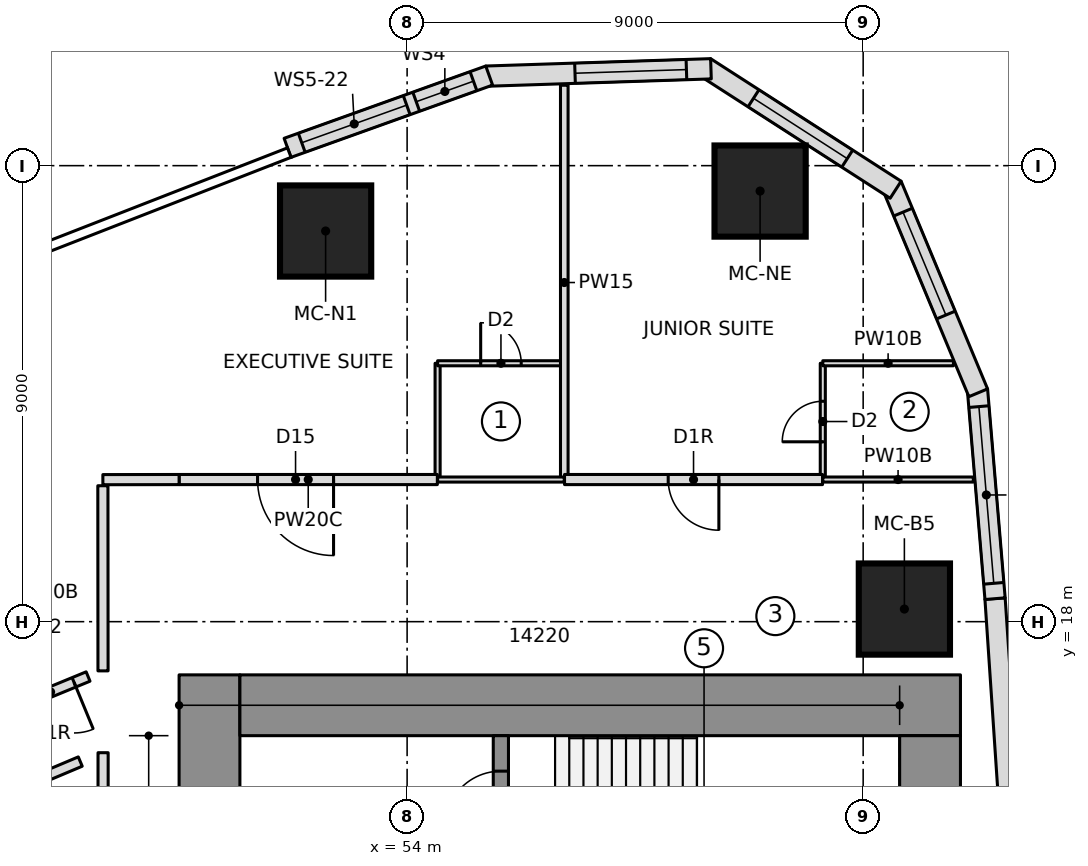
"""IFC4 building model, lengths in metres.
Left out: names, types, materials, properties, quantities, classifications, styles, units other than length and angle.
Written with IfcOpenShell. Run it as: python <this file> out.ifc"""

import sys

from ifc_helpers import new_model, si_unit, direction, frame, frame_2d, origin, origin_2d, place, context, subcontext, project, spatial, polyline, rectangle, outline, extrude, element, fill, save


model = new_model("IFC4")
c1 = context("Model", 3, precision=1e-05, world=origin(), true_north=direction((0.0, 1.0)))
c2 = subcontext(c1, "Body", "Model", "MODEL_VIEW")
j1 = project(units=[si_unit("LENGTHUNIT", "METRE"), si_unit("PLANEANGLEUNIT", "RADIAN")], contexts=[c1])
p1 = place(None, origin())
s1 = spatial("IfcSite", under=j1, at=p1, CompositionType="ELEMENT")
p2 = place(p1, origin())
s2 = spatial("IfcBuilding", under=s1, at=p2, CompositionType="ELEMENT")
p3 = place(p2, frame((0.0, 0.0, 60.9)))
s3 = spatial("IfcBuildingStorey", under=s2, at=p3, CompositionType="ELEMENT", Elevation=60.9)
p4 = place(p3, frame((50.1, 6.65, 0.0), z_axis=(0.0, 0.0, 1.0), x_axis=(0.0, 1.0, 0.0)))
e1 = element("IfcWall", 1, at=p4, inside=s3, PredefinedType="SHEAR", context=c2, shape_type="SweptSolid", body=[
    extrude(rectangle(XDim=10.3, YDim=1.2, at=frame_2d((5.15, 0.0))), origin(), (0.0, 0.0, 1.0), 3.55),
])
p5 = place(p4, frame((6.5, 0.0, 0.0)))
e2 = element("IfcOpeningElement", 2, at=p5, cuts=e1, PredefinedType="OPENING", context=c2, shape_type="SweptSolid", body=[
    extrude(rectangle(XDim=1.1, YDim=2.1, at=frame_2d((0.55, 1.05))), frame((0.0, 0.61, 0.0), z_axis=(0.0, -1.0, 0.0), x_axis=(1.0, 0.0, 0.0)), (0.0, 0.0, 1.0), 1.22),
])
p6 = place(p3, frame((50.7, 16.35, 0.0), z_axis=(0.0, 0.0, 1.0), x_axis=(1.0, 0.0, 0.0)))
e3 = element("IfcWall", 3, at=p6, inside=s3, PredefinedType="SHEAR", context=c2, shape_type="SweptSolid", body=[
    extrude(rectangle(XDim=14.22, YDim=1.2, at=frame_2d((7.11, 0.0))), origin(), (0.0, 0.0, 1.0), 3.55),
])
p7 = place(p3, frame((64.32, 9.95, 0.0), z_axis=(0.0, 0.0, 1.0), x_axis=(0.0, 1.0, 0.0)))
e4 = element("IfcWall", 4, at=p7, inside=s3, PredefinedType="SHEAR", context=c2, shape_type="SweptSolid", body=[
    extrude(rectangle(XDim=5.8, YDim=1.2, at=frame_2d((2.9, 0.0))), origin(), (0.0, 0.0, 1.0), 3.55),
])
p8 = place(p3, frame((55.85, 10.35, 0.0), z_axis=(0.0, 0.0, 1.0), x_axis=(0.0, 1.0, 0.0)))
e5 = element("IfcWall", 5, at=p8, inside=s3, PredefinedType="SHEAR", context=c2, shape_type="SweptSolid", body=[
    extrude(rectangle(XDim=5.4, YDim=0.3, at=frame_2d((2.7, 0.0))), origin(), (0.0, 0.0, 1.0), 3.55),
])
p9 = place(p8, frame((1.43, 0.0, 0.0)))
e6 = element("IfcOpeningElement", 6, at=p9, cuts=e5, PredefinedType="OPENING", context=c2, shape_type="SweptSolid", body=[
    extrude(rectangle(XDim=1.1, YDim=2.1, at=frame_2d((0.55, 1.05))), frame((0.0, 0.16, 0.0), z_axis=(0.0, -1.0, 0.0), x_axis=(1.0, 0.0, 0.0)), (0.0, 0.0, 1.0), 0.32),
])
p10 = place(p8, frame((3.6, 0.0, 0.0)))
e7 = element("IfcOpeningElement", 7, at=p10, cuts=e5, PredefinedType="OPENING", context=c2, shape_type="SweptSolid", body=[
    extrude(rectangle(XDim=1.1, YDim=2.1, at=frame_2d((0.55, 1.05))), frame((0.0, 0.16, 0.0), z_axis=(0.0, -1.0, 0.0), x_axis=(1.0, 0.0, 0.0)), (0.0, 0.0, 1.0), 0.32),
])
for number, where, z_axis, x_axis in (
    (8, (63.813, 18.249, 0.0), (0.0, 0.0, 1.0), (1.0, 0.0, 0.0)),
    (9, (60.966, 26.499, 0.0), (0.0, 0.0, 1.0), (1.0, 0.0, 0.0)),
    (10, (52.392, 25.71, 0.0), (0.0, 0.0, 1.0), (1.0, 0.0, 0.0)),
):
    element("IfcColumn", number, at=place(p3, frame(where, z_axis=z_axis, x_axis=x_axis)), inside=s3, PredefinedType="COLUMN", context=c2, shape_type="SweptSolid", body=[
        extrude(rectangle(XDim=1.8, YDim=1.8, at=origin_2d()), origin(), (0.0, 0.0, 1.0), 3.55),
    ])
p11 = place(p3, frame((65.878, 14.36, 0.0), z_axis=(0.0, 0.0, 1.0), x_axis=(-0.067087430225, 0.997747100575, 0.0)))
e11 = element("IfcWall", 11, at=p11, inside=s3, PredefinedType="NOTDEFINED", context=c2, shape_type="SweptSolid", body=[
    extrude(outline(polyline([(-0.002, -0.2), (4.107, -0.2), (4.103, 0.2), (0.002, 0.2), (-0.002, -0.2)])), origin(), (0.0, 0.0, 1.0), 3.25),
])
p12 = place(p3, frame((65.603, 18.455, 0.0), z_axis=(0.0, 0.0, 1.0), x_axis=(-0.083793550906, 0.996483136248, 0.0)))
e12 = element("IfcWall", 12, at=p12, inside=s3, PredefinedType="NOTDEFINED", context=c2, shape_type="SweptSolid", body=[
    extrude(outline(polyline([(-0.002, -0.2), (4.136, -0.2), (4.074, 0.2), (0.002, 0.2), (-0.002, -0.2)])), origin(), (0.0, 0.0, 1.0), 3.25),
])
p13 = place(p12, frame((0.302, 0.0, 0.9)))
e13 = element("IfcOpeningElement", 13, at=p13, cuts=e12, PredefinedType="OPENING", context=c2, shape_type="SweptSolid", body=[
    extrude(rectangle(XDim=3.5, YDim=1.8, at=frame_2d((1.75, 0.9))), frame((0.0, 0.21, 0.0), z_axis=(0.0, -1.0, 0.0), x_axis=(1.0, 0.0, 0.0)), (0.0, 0.0, 1.0), 0.42),
])
p14 = place(p3, frame((65.259, 22.546, 0.0), z_axis=(0.0, 0.0, 1.0), x_axis=(-0.384372042685, 0.923178277908, 0.0)))
e14 = element("IfcWall", 14, at=p14, inside=s3, PredefinedType="NOTDEFINED", context=c2, shape_type="SweptSolid", body=[
    extrude(outline(polyline([(-0.031, -0.2), (4.408, -0.2), (4.283, 0.2), (0.031, 0.2), (-0.031, -0.2)])), origin(), (0.0, 0.0, 1.0), 3.25),
])
p15 = place(p14, frame((1.631, 0.0, 0.6)))
e15 = element("IfcOpeningElement", 15, at=p15, cuts=e14, PredefinedType="OPENING", context=c2, shape_type="SweptSolid", body=[
    extrude(outline(polyline([(0.0, 1.35), (0.084, 1.771), (0.322, 2.128), (0.679, 2.366), (1.1, 2.45), (1.521, 2.366), (1.878, 2.128), (2.116, 1.771), (2.2, 1.35), (2.2, 1.1), (2.116, 0.679), (1.878, 0.322), (1.521, 0.084), (1.1, 0.0), (0.679, 0.084), (0.322, 0.322), (0.084, 0.679), (0.0, 1.1), (0.0, 1.35)])), frame((0.0, 0.21, 0.0), z_axis=(0.0, -1.0, 0.0), x_axis=(1.0, 0.0, 0.0)), (0.0, 0.0, 1.0), 0.42),
])
p16 = place(p3, frame((63.588, 26.558, 0.0), z_axis=(0.0, 0.0, 1.0), x_axis=(-0.840937468718, 0.541132307025, 0.0)))
e16 = element("IfcWall", 16, at=p16, inside=s3, PredefinedType="NOTDEFINED", context=c2, shape_type="SweptSolid", body=[
    extrude(outline(polyline([(-0.062, -0.2), (4.409, -0.2), (4.284, 0.2), (0.062, 0.2), (-0.062, -0.2)])), origin(), (0.0, 0.0, 1.0), 3.25),
])
p17 = place(p16, frame((1.073, 0.0, 0.6)))
e17 = element("IfcOpeningElement", 17, at=p17, cuts=e16, PredefinedType="OPENING", context=c2, shape_type="SweptSolid", body=[
    extrude(outline(polyline([(0.0, 1.35), (0.084, 1.771), (0.322, 2.128), (0.679, 2.366), (1.1, 2.45), (1.521, 2.366), (1.878, 2.128), (2.116, 1.771), (2.2, 1.35), (2.2, 1.1), (2.116, 0.679), (1.878, 0.322), (1.521, 0.084), (1.1, 0.0), (0.679, 0.084), (0.322, 0.322), (0.084, 0.679), (0.0, 1.1), (0.0, 1.35)])), frame((0.0, 0.21, 0.0), z_axis=(0.0, -1.0, 0.0), x_axis=(1.0, 0.0, 0.0)), (0.0, 0.0, 1.0), 0.42),
])
p18 = place(p3, frame((59.934, 28.91, 0.0), z_axis=(0.0, 0.0, 1.0), x_axis=(-0.999463576228, -0.032749958686, 0.0)))
e18 = element("IfcWall", 18, at=p18, inside=s3, PredefinedType="NOTDEFINED", context=c2, shape_type="SweptSolid", body=[
    extrude(outline(polyline([(-0.062, -0.2), (4.378, -0.2), (4.315, 0.2), (0.062, 0.2), (-0.062, -0.2)])), origin(), (0.0, 0.0, 1.0), 3.25),
])
p19 = place(p18, frame((0.422, 0.0, 0.6)))
e19 = element("IfcOpeningElement", 19, at=p19, cuts=e18, PredefinedType="OPENING", context=c2, shape_type="SweptSolid", body=[
    extrude(outline(polyline([(0.0, 1.35), (0.084, 1.771), (0.322, 2.128), (0.679, 2.366), (1.1, 2.45), (1.521, 2.366), (1.878, 2.128), (2.116, 1.771), (2.2, 1.35), (2.2, 1.1), (2.116, 0.679), (1.878, 0.322), (1.521, 0.084), (1.1, 0.0), (0.679, 0.084), (0.322, 0.322), (0.084, 0.679), (0.0, 1.1), (0.0, 1.35)])), frame((0.0, 0.21, 0.0), z_axis=(0.0, -1.0, 0.0), x_axis=(1.0, 0.0, 0.0)), (0.0, 0.0, 1.0), 0.42),
])
p20 = place(p3, frame((55.59, 28.768, 0.0), z_axis=(0.0, 0.0, 1.0), x_axis=(-0.941339752885, -0.337460323057, 0.0)))
e20 = element("IfcWall", 20, at=p20, inside=s3, PredefinedType="NOTDEFINED", context=c2, shape_type="SweptSolid", body=[
    extrude(outline(polyline([(-0.031, -0.2), (4.196, -0.2), (4.196, 0.2), (0.031, 0.2), (-0.031, -0.2)])), origin(), (0.0, 0.0, 1.0), 3.25),
])
p21 = place(p20, frame((0.298, 0.0, 0.9)))
e21 = element("IfcOpeningElement", 21, at=p21, cuts=e20, PredefinedType="OPENING", context=c2, shape_type="SweptSolid", body=[
    extrude(rectangle(XDim=1.2, YDim=1.8, at=frame_2d((0.6, 0.9))), frame((0.0, 0.21, 0.0), z_axis=(0.0, -1.0, 0.0), x_axis=(1.0, 0.0, 0.0)), (0.0, 0.0, 1.0), 0.42),
])
p22 = place(p20, frame((1.698, 0.0, 0.9)))
e22 = element("IfcOpeningElement", 22, at=p22, cuts=e20, PredefinedType="OPENING", context=c2, shape_type="SweptSolid", body=[
    extrude(rectangle(XDim=2.2, YDim=1.8, at=frame_2d((1.1, 0.9))), frame((0.0, 0.21, 0.0), z_axis=(0.0, -1.0, 0.0), x_axis=(1.0, 0.0, 0.0)), (0.0, 0.0, 1.0), 0.42),
])
p23 = place(p3, frame((54.602, 20.8, 0.0), z_axis=(0.0, 0.0, 1.0), x_axis=(0.0, 1.0, 0.0)))
e23 = element("IfcWall", 23, at=p23, inside=s3, PredefinedType="PARTITIONING", context=c2, shape_type="SweptSolid", body=[
    extrude(rectangle(XDim=2.3, YDim=0.1, at=frame_2d((1.15, 0.0))), origin(), (0.0, 0.0, 1.0), 3.25),
])
p24 = place(p3, frame((54.602, 23.1, 0.0), z_axis=(0.0, 0.0, 1.0), x_axis=(1.0, 0.0, 0.0)))
e24 = element("IfcWall", 24, at=p24, inside=s3, PredefinedType="PARTITIONING", context=c2, shape_type="SweptSolid", body=[
    extrude(rectangle(XDim=2.5, YDim=0.1, at=frame_2d((1.25, 0.0))), origin(), (0.0, 0.0, 1.0), 3.25),
])
p25 = place(p24, frame((0.85, 0.0, 0.0)))
e25 = element("IfcOpeningElement", 25, at=p25, cuts=e24, PredefinedType="OPENING", context=c2, shape_type="SweptSolid", body=[
    extrude(rectangle(XDim=0.8, YDim=2.1, at=frame_2d((0.4, 1.05))), frame((0.0, 0.06, 0.0), z_axis=(0.0, -1.0, 0.0), x_axis=(1.0, 0.0, 0.0)), (0.0, 0.0, 1.0), 0.12),
])
p26 = place(p3, frame((62.203, 20.8, 0.0), z_axis=(0.0, 0.0, 1.0), x_axis=(0.0, 1.0, 0.0)))
e26 = element("IfcWall", 26, at=p26, inside=s3, PredefinedType="PARTITIONING", context=c2, shape_type="SweptSolid", body=[
    extrude(rectangle(XDim=2.3, YDim=0.1, at=frame_2d((1.15, 0.0))), origin(), (0.0, 0.0, 1.0), 3.25),
])
p27 = place(p26, frame((0.75, 0.0, 0.0)))
e27 = element("IfcOpeningElement", 27, at=p27, cuts=e26, PredefinedType="OPENING", context=c2, shape_type="SweptSolid", body=[
    extrude(rectangle(XDim=0.8, YDim=2.1, at=frame_2d((0.4, 1.05))), frame((0.0, 0.06, 0.0), z_axis=(0.0, -1.0, 0.0), x_axis=(1.0, 0.0, 0.0)), (0.0, 0.0, 1.0), 0.12),
])
p28 = place(p3, frame((62.203, 23.1, 0.0), z_axis=(0.0, 0.0, 1.0), x_axis=(1.0, 0.0, 0.0)))
e28 = element("IfcWall", 28, at=p28, inside=s3, PredefinedType="PARTITIONING", context=c2, shape_type="SweptSolid", body=[
    extrude(rectangle(XDim=2.578, YDim=0.1, at=frame_2d((1.289, 0.0))), origin(), (0.0, 0.0, 1.0), 3.25),
])
p29 = place(p3, frame((57.102, 20.8, 0.0), z_axis=(0.0, 0.0, 1.0), x_axis=(0.0, 1.0, 0.0)))
e29 = element("IfcWall", 29, at=p29, inside=s3, PredefinedType="PARTITIONING", context=c2, shape_type="SweptSolid", body=[
    extrude(rectangle(XDim=7.787, YDim=0.15, at=frame_2d((3.894, 0.0))), origin(), (0.0, 0.0, 1.0), 3.25),
])
p30 = place(p3, frame((43.85, 13.677, 0.0), z_axis=(0.0, 0.0, 1.0), x_axis=(0.921269894054, 0.388923877269, 0.0)))
e30 = element("IfcWall", 30, at=p30, inside=s3, PredefinedType="PARTITIONING", context=c2, shape_type="SweptSolid", body=[
    extrude(rectangle(XDim=4.016, YDim=0.2, at=frame_2d((2.008, 0.0))), origin(), (0.0, 0.0, 1.0), 3.25),
])
p31 = place(p3, frame((54.597, 20.805, 0.0), z_axis=(0.0, 0.0, 1.0), x_axis=(-1.0, 0.0, 0.0)))
e31 = element("IfcWall", 31, at=p31, inside=s3, PredefinedType="PARTITIONING", context=c2, shape_type="SweptSolid", body=[
    extrude(rectangle(XDim=5.097, YDim=0.2, at=frame_2d((2.548, 0.0))), origin(), (0.0, 0.0, 1.0), 3.25),
])
p32 = place(p31, frame((2.048, 0.0, 0.0)))
e32 = element("IfcOpeningElement", 32, at=p32, cuts=e31, PredefinedType="OPENING", context=c2, shape_type="SweptSolid", body=[
    extrude(rectangle(XDim=1.5, YDim=2.1, at=frame_2d((0.75, 1.05))), frame((0.0, 0.11, 0.0), z_axis=(0.0, -1.0, 0.0), x_axis=(1.0, 0.0, 0.0)), (0.0, 0.0, 1.0), 0.22),
])
p33 = place(p3, frame((62.198, 20.805, 0.0), z_axis=(0.0, 0.0, 1.0), x_axis=(-1.0, 0.0, 0.0)))
e33 = element("IfcWall", 33, at=p33, inside=s3, PredefinedType="PARTITIONING", context=c2, shape_type="SweptSolid", body=[
    extrude(rectangle(XDim=5.092, YDim=0.2, at=frame_2d((2.546, 0.0))), origin(), (0.0, 0.0, 1.0), 3.25),
])
p34 = place(p33, frame((2.046, 0.0, 0.0)))
e34 = element("IfcOpeningElement", 34, at=p34, cuts=e33, PredefinedType="OPENING", context=c2, shape_type="SweptSolid", body=[
    extrude(rectangle(XDim=1.0, YDim=2.1, at=frame_2d((0.5, 1.05))), frame((0.0, 0.11, 0.0), z_axis=(0.0, -1.0, 0.0), x_axis=(1.0, 0.0, 0.0)), (0.0, 0.0, 1.0), 0.22),
])
p35 = place(p3, frame((57.102, 20.805, 0.0), z_axis=(0.0, 0.0, 1.0), x_axis=(-1.0, 0.0, 0.0)))
e35 = element("IfcWall", 35, at=p35, inside=s3, PredefinedType="PARTITIONING", context=c2, shape_type="SweptSolid", body=[
    extrude(rectangle(XDim=2.5, YDim=0.1, at=frame_2d((1.25, 0.0))), origin(), (0.0, 0.0, 1.0), 3.25),
])
p36 = place(p3, frame((65.175, 20.805, 0.0), z_axis=(0.0, 0.0, 1.0), x_axis=(-1.0, 0.0, 0.0)))
e36 = element("IfcWall", 36, at=p36, inside=s3, PredefinedType="PARTITIONING", context=c2, shape_type="SweptSolid", body=[
    extrude(rectangle(XDim=2.971, YDim=0.1, at=frame_2d((1.486, 0.0))), origin(), (0.0, 0.0, 1.0), 3.25),
])
p37 = place(p3, frame((47.704, 16.917, 0.0), z_axis=(0.0, 0.0, 1.0), x_axis=(-0.924573816857, -0.381002962169, 0.0)))
e37 = element("IfcWall", 37, at=p37, inside=s3, PredefinedType="PARTITIONING", context=c2, shape_type="SweptSolid", body=[
    extrude(rectangle(XDim=3.929, YDim=0.2, at=frame_2d((1.964, 0.0))), origin(), (0.0, 0.0, 1.0), 3.25),
])
p38 = place(p37, frame((0.3, 0.0, 0.0)))
e38 = element("IfcOpeningElement", 38, at=p38, cuts=e37, PredefinedType="OPENING", context=c2, shape_type="SweptSolid", body=[
    extrude(rectangle(XDim=1.0, YDim=2.1, at=frame_2d((0.5, 1.05))), frame((0.0, 0.11, 0.0), z_axis=(0.0, -1.0, 0.0), x_axis=(1.0, 0.0, 0.0)), (0.0, 0.0, 1.0), 0.22),
])
p39 = place(p3, frame((48.0, 15.414, 0.0), z_axis=(0.0, 0.0, 1.0), x_axis=(0.0, -1.0, 0.0)))
e39 = element("IfcWall", 39, at=p39, inside=s3, PredefinedType="PARTITIONING", context=c2, shape_type="SweptSolid", body=[
    extrude(rectangle(XDim=30.828, YDim=0.2, at=frame_2d((15.414, 0.0))), origin(), (0.0, 0.0, 1.0), 3.25),
])
p40 = place(p3, frame((49.5, 20.805, 0.0), z_axis=(0.0, 0.0, 1.0), x_axis=(-0.999998933031, -0.001460800259, 0.0)))
e40 = element("IfcWall", 40, at=p40, inside=s3, PredefinedType="PARTITIONING", context=c2, shape_type="SweptSolid", body=[
    extrude(rectangle(XDim=1.504, YDim=0.2, at=frame_2d((0.752, 0.0))), origin(), (0.0, 0.0, 1.0), 3.25),
])
p41 = place(p3, frame((47.996, 20.683, 0.0), z_axis=(0.0, 0.0, 1.0), x_axis=(0.000801763623, -0.999999678587, 0.0)))
e41 = element("IfcWall", 41, at=p41, inside=s3, PredefinedType="PARTITIONING", context=c2, shape_type="SweptSolid", body=[
    extrude(rectangle(XDim=3.654, YDim=0.2, at=frame_2d((1.827, 0.0))), origin(), (0.0, 0.0, 1.0), 3.25),
])
p42 = place(p13, origin())
e42 = element("IfcWindow", 42, at=p42, inside=s3, PartitioningType="SINGLE_PANEL", PredefinedType="WINDOW", context=c2, shape_type="SweptSolid", body=[
    extrude(rectangle(XDim=3.5, YDim=1.8, at=frame_2d((1.75, 0.9))), frame((0.0, 0.17, 0.0), z_axis=(0.0, -1.0, 0.0), x_axis=(1.0, 0.0, 0.0)), (0.0, 0.0, 1.0), 0.06),
])
fill(e13, e42)
p43 = place(p15, origin())
e43 = element("IfcWindow", 43, at=p43, inside=s3, PartitioningType="SINGLE_PANEL", PredefinedType="WINDOW", context=c2, shape_type="SweptSolid", body=[
    extrude(outline(polyline([(0.0, 1.35), (0.084, 1.771), (0.322, 2.128), (0.679, 2.366), (1.1, 2.45), (1.521, 2.366), (1.878, 2.128), (2.116, 1.771), (2.2, 1.35), (2.2, 1.1), (2.116, 0.679), (1.878, 0.322), (1.521, 0.084), (1.1, 0.0), (0.679, 0.084), (0.322, 0.322), (0.084, 0.679), (0.0, 1.1), (0.0, 1.35)])), frame((0.0, 0.17, 0.0), z_axis=(0.0, -1.0, 0.0), x_axis=(1.0, 0.0, 0.0)), (0.0, 0.0, 1.0), 0.06),
])
fill(e15, e43)
p44 = place(p17, origin())
e44 = element("IfcWindow", 44, at=p44, inside=s3, PartitioningType="SINGLE_PANEL", PredefinedType="WINDOW", context=c2, shape_type="SweptSolid", body=[
    extrude(outline(polyline([(0.0, 1.35), (0.084, 1.771), (0.322, 2.128), (0.679, 2.366), (1.1, 2.45), (1.521, 2.366), (1.878, 2.128), (2.116, 1.771), (2.2, 1.35), (2.2, 1.1), (2.116, 0.679), (1.878, 0.322), (1.521, 0.084), (1.1, 0.0), (0.679, 0.084), (0.322, 0.322), (0.084, 0.679), (0.0, 1.1), (0.0, 1.35)])), frame((0.0, 0.17, 0.0), z_axis=(0.0, -1.0, 0.0), x_axis=(1.0, 0.0, 0.0)), (0.0, 0.0, 1.0), 0.06),
])
fill(e17, e44)
p45 = place(p19, origin())
e45 = element("IfcWindow", 45, at=p45, inside=s3, PartitioningType="SINGLE_PANEL", PredefinedType="WINDOW", context=c2, shape_type="SweptSolid", body=[
    extrude(outline(polyline([(0.0, 1.35), (0.084, 1.771), (0.322, 2.128), (0.679, 2.366), (1.1, 2.45), (1.521, 2.366), (1.878, 2.128), (2.116, 1.771), (2.2, 1.35), (2.2, 1.1), (2.116, 0.679), (1.878, 0.322), (1.521, 0.084), (1.1, 0.0), (0.679, 0.084), (0.322, 0.322), (0.084, 0.679), (0.0, 1.1), (0.0, 1.35)])), frame((0.0, 0.17, 0.0), z_axis=(0.0, -1.0, 0.0), x_axis=(1.0, 0.0, 0.0)), (0.0, 0.0, 1.0), 0.06),
])
fill(e19, e45)
p46 = place(p21, origin())
e46 = element("IfcWindow", 46, at=p46, inside=s3, PartitioningType="SINGLE_PANEL", PredefinedType="WINDOW", context=c2, shape_type="SweptSolid", body=[
    extrude(rectangle(XDim=1.2, YDim=1.8, at=frame_2d((0.6, 0.9))), frame((0.0, 0.17, 0.0), z_axis=(0.0, -1.0, 0.0), x_axis=(1.0, 0.0, 0.0)), (0.0, 0.0, 1.0), 0.06),
])
fill(e21, e46)
p47 = place(p22, origin())
e47 = element("IfcWindow", 47, at=p47, inside=s3, PartitioningType="SINGLE_PANEL", PredefinedType="WINDOW", context=c2, shape_type="SweptSolid", body=[
    extrude(rectangle(XDim=2.2, YDim=1.8, at=frame_2d((1.1, 0.9))), frame((0.0, 0.17, 0.0), z_axis=(0.0, -1.0, 0.0), x_axis=(1.0, 0.0, 0.0)), (0.0, 0.0, 1.0), 0.06),
])
fill(e22, e47)
p48 = place(p25, origin())
e48 = element("IfcDoor", 48, at=p48, inside=s3, OperationType="SINGLE_SWING_LEFT", PredefinedType="DOOR", context=c2, shape_type="SweptSolid", body=[
    extrude(rectangle(XDim=0.8, YDim=2.1, at=frame_2d((0.4, 1.05))), frame((0.0, 0.025, 0.0), z_axis=(0.0, -1.0, 0.0), x_axis=(1.0, 0.0, 0.0)), (0.0, 0.0, 1.0), 0.05),
])
fill(e25, e48)
p49 = place(p27, origin())
e49 = element("IfcDoor", 49, at=p49, inside=s3, OperationType="SINGLE_SWING_LEFT", PredefinedType="DOOR", context=c2, shape_type="SweptSolid", body=[
    extrude(rectangle(XDim=0.8, YDim=2.1, at=frame_2d((0.4, 1.05))), frame((0.0, 0.025, 0.0), z_axis=(0.0, -1.0, 0.0), x_axis=(1.0, 0.0, 0.0)), (0.0, 0.0, 1.0), 0.05),
])
fill(e27, e49)
p50 = place(p38, origin())
e50 = element("IfcDoor", 50, at=p50, inside=s3, OperationType="SINGLE_SWING_RIGHT", PredefinedType="DOOR", context=c2, shape_type="SweptSolid", body=[
    extrude(rectangle(XDim=1.0, YDim=2.1, at=frame_2d((0.5, 1.05))), frame((0.0, 0.025, 0.0), z_axis=(0.0, -1.0, 0.0), x_axis=(1.0, 0.0, 0.0)), (0.0, 0.0, 1.0), 0.05),
])
fill(e38, e50)
p51 = place(p32, origin())
e51 = element("IfcDoor", 51, at=p51, inside=s3, OperationType="DOUBLE_DOOR_SINGLE_SWING", PredefinedType="DOOR", context=c2, shape_type="SweptSolid", body=[
    extrude(rectangle(XDim=1.5, YDim=2.1, at=frame_2d((0.75, 1.05))), frame((0.0, 0.025, 0.0), z_axis=(0.0, -1.0, 0.0), x_axis=(1.0, 0.0, 0.0)), (0.0, 0.0, 1.0), 0.05),
])
fill(e32, e51)
p52 = place(p34, origin())
e52 = element("IfcDoor", 52, at=p52, inside=s3, OperationType="SINGLE_SWING_RIGHT", PredefinedType="DOOR", context=c2, shape_type="SweptSolid", body=[
    extrude(rectangle(XDim=1.0, YDim=2.1, at=frame_2d((0.5, 1.05))), frame((0.0, 0.025, 0.0), z_axis=(0.0, -1.0, 0.0), x_axis=(1.0, 0.0, 0.0)), (0.0, 0.0, 1.0), 0.05),
])
fill(e34, e52)
p53 = place(p10, origin())
e53 = element("IfcDoor", 53, at=p53, inside=s3, OperationType="SINGLE_SWING_RIGHT", PredefinedType="DOOR", context=c2, shape_type="SweptSolid", body=[
    extrude(rectangle(XDim=1.1, YDim=2.1, at=frame_2d((0.55, 1.05))), frame((0.0, 0.025, 0.0), z_axis=(0.0, -1.0, 0.0), x_axis=(1.0, 0.0, 0.0)), (0.0, 0.0, 1.0), 0.05),
])
fill(e7, e53)
save(model, sys.argv[1])
